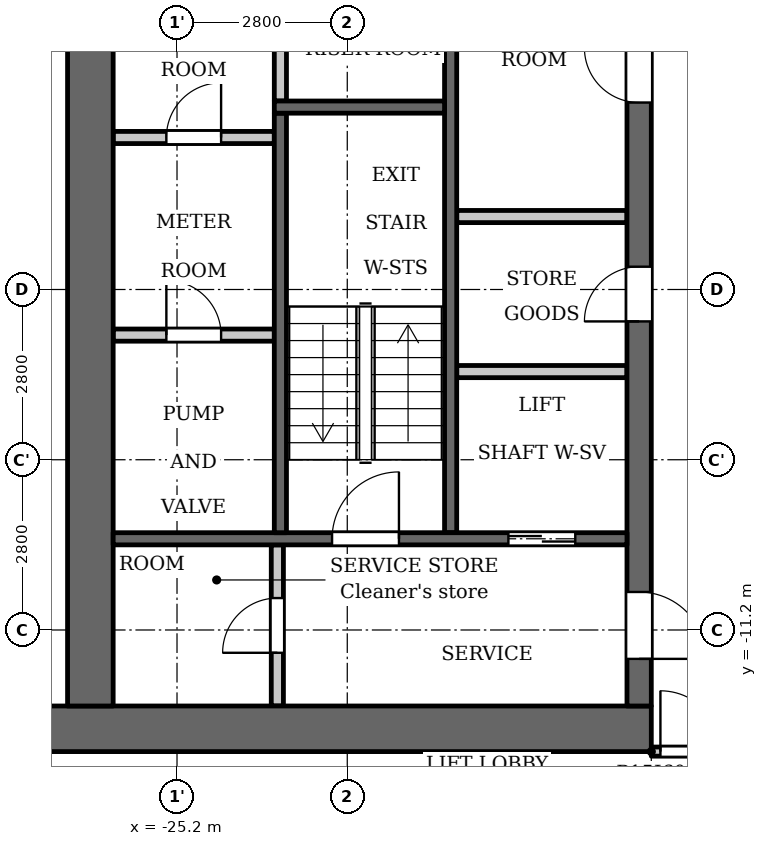
"""IFC4 building model, lengths in metres.
Left out: names, types, materials, properties, quantities, classifications, styles, units other than length and angle.
Written with IfcOpenShell. Run it as: python <this file> out.ifc"""

import sys

from ifc_helpers import new_model, si_unit, direction, frame, frame_2d, origin, place, context, subcontext, project, spatial, rectangle, extrude, element, fill, save


model = new_model("IFC4")
c1 = context("Model", 3, precision=1e-05, world=origin(), true_north=direction((0.0, 1.0)))
c2 = subcontext(c1, "Body", "Model", "MODEL_VIEW")
j1 = project(units=[si_unit("LENGTHUNIT", "METRE"), si_unit("PLANEANGLEUNIT", "RADIAN")], contexts=[c1])
p1 = place(None, origin())
s1 = spatial("IfcSite", under=j1, at=p1, CompositionType="ELEMENT")
p2 = place(p1, origin())
s2 = spatial("IfcBuilding", under=s1, at=p2, CompositionType="ELEMENT")
p3 = place(p2, frame((0.0, 0.0, 146.6)))
s3 = spatial("IfcBuildingStorey", under=s2, at=p3, CompositionType="ELEMENT", Elevation=146.6)
p4 = place(p3, frame((-23.5, -2.5, 0.0), z_axis=(0.0, 0.0, 1.0), x_axis=(0.0, 1.0, 0.0)))
e1 = element("IfcWall", 1, at=p4, inside=s3, PredefinedType="PARTITIONING", context=c2, shape_type="SweptSolid", body=[
    extrude(rectangle(XDim=2.65, YDim=0.2, at=frame_2d((1.325, 0.0))), origin(), (0.0, 0.0, 1.0), 3.2),
])
p5 = place(p3, frame((-20.7, -9.6, 0.0), z_axis=(0.0, 0.0, 1.0), x_axis=(0.0, 1.0, 0.0)))
e2 = element("IfcWall", 2, at=p5, inside=s3, PredefinedType="SHEAR", context=c2, shape_type="SweptSolid", body=[
    extrude(rectangle(XDim=9.75, YDim=0.2, at=frame_2d((4.875, 0.0))), origin(), (0.0, 0.0, 1.0), 3.2),
])
p6 = place(p3, frame((-17.4, -12.825, 0.0), z_axis=(0.0, 0.0, 1.0), x_axis=(-1.0, 0.0, 0.0)))
e3 = element("IfcWall", 3, at=p6, inside=s3, PredefinedType="SHEAR", context=c2, shape_type="SweptSolid", body=[
    extrude(rectangle(XDim=10.4, YDim=0.75, at=frame_2d((5.2, 0.0))), origin(), (0.0, 0.0, 1.0), 3.2),
])
p7 = place(p3, frame((-17.8, -4.4, 0.0), z_axis=(0.0, 0.0, 1.0), x_axis=(-1.0, 0.0, 0.0)))
e4 = element("IfcWall", 4, at=p7, inside=s3, PredefinedType="PARTITIONING", context=c2, shape_type="SweptSolid", body=[
    extrude(rectangle(XDim=2.8, YDim=0.2, at=frame_2d((1.4, 0.0))), origin(), (0.0, 0.0, 1.0), 3.2),
])
p8 = place(p3, frame((-17.6, -12.45, 0.0), z_axis=(0.0, 0.0, 1.0), x_axis=(0.0, 1.0, 0.0)))
e5 = element("IfcWall", 5, at=p8, inside=s3, PredefinedType="SHEAR", context=c2, shape_type="SweptSolid", body=[
    extrude(rectangle(XDim=24.9, YDim=0.4, at=frame_2d((12.45, 0.0))), origin(), (0.0, 0.0, 1.0), 3.2),
])
p9 = place(p8, frame((6.325, 0.0, 0.0)))
e6 = element("IfcOpeningElement", 6, at=p9, cuts=e5, PredefinedType="OPENING", context=c2, shape_type="SweptSolid", body=[
    extrude(rectangle(XDim=0.9, YDim=2.1, at=frame_2d((0.45, 1.05))), frame((0.0, 0.21, 0.0), z_axis=(0.0, -1.0, 0.0), x_axis=(1.0, 0.0, 0.0)), (0.0, 0.0, 1.0), 0.42),
])
p10 = place(p8, frame((9.925, 0.0, 0.0)))
e7 = element("IfcOpeningElement", 7, at=p10, cuts=e5, PredefinedType="OPENING", context=c2, shape_type="SweptSolid", body=[
    extrude(rectangle(XDim=0.9, YDim=2.1, at=frame_2d((0.45, 1.05))), frame((0.0, 0.21, 0.0), z_axis=(0.0, -1.0, 0.0), x_axis=(1.0, 0.0, 0.0)), (0.0, 0.0, 1.0), 0.42),
])
p11 = place(p8, frame((15.6, 0.0, 0.0)))
e8 = element("IfcOpeningElement", 8, at=p11, cuts=e5, PredefinedType="OPENING", context=c2, shape_type="SweptSolid", body=[
    extrude(rectangle(XDim=1.1, YDim=2.1, at=frame_2d((0.55, 1.05))), frame((0.0, 0.21, 0.0), z_axis=(0.0, -1.0, 0.0), x_axis=(1.0, 0.0, 0.0)), (0.0, 0.0, 1.0), 0.42),
])
p12 = place(p8, frame((18.0, 0.0, 0.0)))
e9 = element("IfcOpeningElement", 9, at=p12, cuts=e5, PredefinedType="OPENING", context=c2, shape_type="SweptSolid", body=[
    extrude(rectangle(XDim=1.1, YDim=2.1, at=frame_2d((0.55, 1.05))), frame((0.0, 0.21, 0.0), z_axis=(0.0, -1.0, 0.0), x_axis=(1.0, 0.0, 0.0)), (0.0, 0.0, 1.0), 0.42),
])
p13 = place(p8, frame((23.025, 0.0, 0.0)))
e10 = element("IfcOpeningElement", 10, at=p13, cuts=e5, PredefinedType="OPENING", context=c2, shape_type="SweptSolid", body=[
    extrude(rectangle(XDim=1.1, YDim=2.1, at=frame_2d((0.55, 1.05))), frame((0.0, 0.21, 0.0), z_axis=(0.0, -1.0, 0.0), x_axis=(1.0, 0.0, 0.0)), (0.0, 0.0, 1.0), 0.42),
])
p14 = place(p8, frame((0.775, 0.0, 0.0)))
e11 = element("IfcOpeningElement", 11, at=p14, cuts=e5, PredefinedType="OPENING", context=c2, shape_type="SweptSolid", body=[
    extrude(rectangle(XDim=1.1, YDim=2.1, at=frame_2d((0.55, 1.05))), frame((0.0, 0.21, 0.0), z_axis=(0.0, -1.0, 0.0), x_axis=(1.0, 0.0, 0.0)), (0.0, 0.0, 1.0), 0.42),
])
p15 = place(p8, frame((12.925, 0.0, 0.0)))
e12 = element("IfcOpeningElement", 12, at=p15, cuts=e5, PredefinedType="OPENING", context=c2, shape_type="SweptSolid", body=[
    extrude(rectangle(XDim=1.8, YDim=2.1, at=frame_2d((0.9, 1.05))), frame((0.0, 0.21, 0.0), z_axis=(0.0, -1.0, 0.0), x_axis=(1.0, 0.0, 0.0)), (0.0, 0.0, 1.0), 0.42),
])
p16 = place(p3, frame((-26.625, -12.45, 0.0), z_axis=(0.0, 0.0, 1.0), x_axis=(0.0, 1.0, 0.0)))
e13 = element("IfcWall", 13, at=p16, inside=s3, PredefinedType="SHEAR", context=c2, shape_type="SweptSolid", body=[
    extrude(rectangle(XDim=24.9, YDim=0.75, at=frame_2d((12.45, 0.0))), origin(), (0.0, 0.0, 1.0), 3.2),
])
p17 = place(p3, frame((-23.55, -12.45, 0.0), z_axis=(0.0, 0.0, 1.0), x_axis=(0.0, 1.0, 0.0)))
e14 = element("IfcWall", 14, at=p17, inside=s3, PredefinedType="PARTITIONING", context=c2, shape_type="SweptSolid", body=[
    extrude(rectangle(XDim=2.65, YDim=0.2, at=frame_2d((1.325, 0.0))), origin(), (0.0, 0.0, 1.0), 3.2),
])
p18 = place(p17, frame((0.875, 0.0, 0.0)))
e15 = element("IfcOpeningElement", 15, at=p18, cuts=e14, PredefinedType="OPENING", context=c2, shape_type="SweptSolid", body=[
    extrude(rectangle(XDim=0.9, YDim=2.1, at=frame_2d((0.45, 1.05))), frame((0.0, 0.11, 0.0), z_axis=(0.0, -1.0, 0.0), x_axis=(1.0, 0.0, 0.0)), (0.0, 0.0, 1.0), 0.22),
])
p19 = place(p3, frame((-23.6, -6.35, 0.0), z_axis=(0.0, 0.0, 1.0), x_axis=(-1.0, 0.0, 0.0)))
e16 = element("IfcWall", 16, at=p19, inside=s3, PredefinedType="PARTITIONING", context=c2, shape_type="SweptSolid", body=[
    extrude(rectangle(XDim=2.65, YDim=0.2, at=frame_2d((1.325, 0.0))), origin(), (0.0, 0.0, 1.0), 3.2),
])
p20 = place(p19, frame((0.875, 0.0, 0.0)))
e17 = element("IfcOpeningElement", 17, at=p20, cuts=e16, PredefinedType="OPENING", context=c2, shape_type="SweptSolid", body=[
    extrude(rectangle(XDim=0.9, YDim=2.1, at=frame_2d((0.45, 1.05))), frame((0.0, 0.11, 0.0), z_axis=(0.0, -1.0, 0.0), x_axis=(1.0, 0.0, 0.0)), (0.0, 0.0, 1.0), 0.22),
])
p21 = place(p3, frame((-23.6, -3.1, 0.0), z_axis=(0.0, 0.0, 1.0), x_axis=(-1.0, 0.0, 0.0)))
e18 = element("IfcWall", 18, at=p21, inside=s3, PredefinedType="PARTITIONING", context=c2, shape_type="SweptSolid", body=[
    extrude(rectangle(XDim=2.65, YDim=0.2, at=frame_2d((1.325, 0.0))), origin(), (0.0, 0.0, 1.0), 3.2),
])
p22 = place(p21, frame((0.875, 0.0, 0.0)))
e19 = element("IfcOpeningElement", 19, at=p22, cuts=e18, PredefinedType="OPENING", context=c2, shape_type="SweptSolid", body=[
    extrude(rectangle(XDim=0.9, YDim=2.1, at=frame_2d((0.45, 1.05))), frame((0.0, 0.11, 0.0), z_axis=(0.0, -1.0, 0.0), x_axis=(1.0, 0.0, 0.0)), (0.0, 0.0, 1.0), 0.22),
])
p23 = place(p3, frame((-17.8, -9.7, 0.0), z_axis=(0.0, 0.0, 1.0), x_axis=(-1.0, 0.0, 0.0)))
e20 = element("IfcWall", 20, at=p23, inside=s3, PredefinedType="SHEAR", context=c2, shape_type="SweptSolid", body=[
    extrude(rectangle(XDim=8.45, YDim=0.2, at=frame_2d((4.225, 0.0))), origin(), (0.0, 0.0, 1.0), 3.2),
])
p24 = place(p23, frame((0.85, 0.0, 0.0)))
e21 = element("IfcOpeningElement", 21, at=p24, cuts=e20, PredefinedType="OPENING", context=c2, shape_type="SweptSolid", body=[
    extrude(rectangle(XDim=1.1, YDim=2.1, at=frame_2d((0.55, 1.05))), frame((0.0, 0.11, 0.0), z_axis=(0.0, -1.0, 0.0), x_axis=(1.0, 0.0, 0.0)), (0.0, 0.0, 1.0), 0.22),
])
p25 = place(p23, frame((3.75, 0.0, 0.0)))
e22 = element("IfcOpeningElement", 22, at=p25, cuts=e20, PredefinedType="OPENING", context=c2, shape_type="SweptSolid", body=[
    extrude(rectangle(XDim=1.1, YDim=2.1, at=frame_2d((0.55, 1.05))), frame((0.0, 0.11, 0.0), z_axis=(0.0, -1.0, 0.0), x_axis=(1.0, 0.0, 0.0)), (0.0, 0.0, 1.0), 0.22),
])
p26 = place(p3, frame((-17.8, -6.95, 0.0), z_axis=(0.0, 0.0, 1.0), x_axis=(-1.0, 0.0, 0.0)))
e23 = element("IfcWall", 23, at=p26, inside=s3, PredefinedType="PARTITIONING", context=c2, shape_type="SweptSolid", body=[
    extrude(rectangle(XDim=2.8, YDim=0.2, at=frame_2d((1.4, 0.0))), origin(), (0.0, 0.0, 1.0), 3.2),
])
p27 = place(p3, frame((-23.5, -9.6, 0.0), z_axis=(0.0, 0.0, 1.0), x_axis=(0.0, 1.0, 0.0)))
e24 = element("IfcWall", 24, at=p27, inside=s3, PredefinedType="SHEAR", context=c2, shape_type="SweptSolid", body=[
    extrude(rectangle(XDim=6.9, YDim=0.2, at=frame_2d((3.45, 0.0))), origin(), (0.0, 0.0, 1.0), 3.2),
])
p28 = place(p3, frame((-20.8, -2.6, 0.0), z_axis=(0.0, 0.0, 1.0), x_axis=(-1.0, 0.0, 0.0)))
e25 = element("IfcWall", 25, at=p28, inside=s3, PredefinedType="SHEAR", context=c2, shape_type="SweptSolid", body=[
    extrude(rectangle(XDim=2.8, YDim=0.2, at=frame_2d((1.4, 0.0))), origin(), (0.0, 0.0, 1.0), 3.2),
])
p29 = place(p3, frame((-17.4, -13.2, 0.0), z_axis=(0.0, 0.0, 1.0), x_axis=(1.0, 0.0, 0.0)))
e26 = element("IfcWall", 26, at=p29, inside=s3, PredefinedType="PARTITIONING", context=c2, shape_type="SweptSolid", body=[
    extrude(rectangle(XDim=34.8, YDim=0.15, at=frame_2d((17.4, 0.0))), origin(), (0.0, 0.0, 1.0), 3.2),
])
p30 = place(p29, frame((0.15, 0.0, 0.0)))
e27 = element("IfcOpeningElement", 27, at=p30, cuts=e26, PredefinedType="OPENING", context=c2, shape_type="SweptSolid", body=[
    extrude(rectangle(XDim=1.0, YDim=2.1, at=frame_2d((0.5, 1.05))), frame((0.0, 0.085, 0.0), z_axis=(0.0, -1.0, 0.0), x_axis=(1.0, 0.0, 0.0)), (0.0, 0.0, 1.0), 0.17),
])
p31 = place(p29, frame((33.55, 0.0, 0.0)))
e28 = element("IfcOpeningElement", 28, at=p31, cuts=e26, PredefinedType="OPENING", context=c2, shape_type="SweptSolid", body=[
    extrude(rectangle(XDim=1.0, YDim=2.1, at=frame_2d((0.5, 1.05))), frame((0.0, 0.085, 0.0), z_axis=(0.0, -1.0, 0.0), x_axis=(1.0, 0.0, 0.0)), (0.0, 0.0, 1.0), 0.17),
])
p32 = place(p29, frame((15.7, 0.0, 0.0)))
e29 = element("IfcOpeningElement", 29, at=p32, cuts=e26, PredefinedType="OPENING", context=c2, shape_type="SweptSolid", body=[
    extrude(rectangle(XDim=1.0, YDim=2.1, at=frame_2d((0.5, 1.05))), frame((0.0, 0.085, 0.0), z_axis=(0.0, -1.0, 0.0), x_axis=(1.0, 0.0, 0.0)), (0.0, 0.0, 1.0), 0.17),
])
p33 = place(p24, origin())
e30 = element("IfcDoor", 30, at=p33, inside=s3, OperationType="DOUBLE_DOOR_SLIDING", PredefinedType="DOOR", context=c2, shape_type="SweptSolid", body=[
    extrude(rectangle(XDim=1.1, YDim=2.1, at=frame_2d((0.55, 1.05))), frame((0.0, 0.025, 0.0), z_axis=(0.0, -1.0, 0.0), x_axis=(1.0, 0.0, 0.0)), (0.0, 0.0, 1.0), 0.05),
])
fill(e21, e30)
p34 = place(p9, origin())
e31 = element("IfcDoor", 31, at=p34, inside=s3, OperationType="SINGLE_SWING_RIGHT", PredefinedType="DOOR", context=c2, shape_type="SweptSolid", body=[
    extrude(rectangle(XDim=0.9, YDim=2.1, at=frame_2d((0.45, 1.05))), frame((0.0, 0.025, 0.0), z_axis=(0.0, -1.0, 0.0), x_axis=(1.0, 0.0, 0.0)), (0.0, 0.0, 1.0), 0.05),
])
fill(e6, e31)
p35 = place(p10, origin())
e32 = element("IfcDoor", 32, at=p35, inside=s3, OperationType="SINGLE_SWING_LEFT", PredefinedType="DOOR", context=c2, shape_type="SweptSolid", body=[
    extrude(rectangle(XDim=0.9, YDim=2.1, at=frame_2d((0.45, 1.05))), frame((0.0, 0.025, 0.0), z_axis=(0.0, -1.0, 0.0), x_axis=(1.0, 0.0, 0.0)), (0.0, 0.0, 1.0), 0.05),
])
fill(e7, e32)
p36 = place(p14, origin())
e33 = element("IfcDoor", 33, at=p36, inside=s3, OperationType="SINGLE_SWING_LEFT", PredefinedType="DOOR", context=c2, shape_type="SweptSolid", body=[
    extrude(rectangle(XDim=1.1, YDim=2.1, at=frame_2d((0.55, 1.05))), frame((0.0, 0.025, 0.0), z_axis=(0.0, -1.0, 0.0), x_axis=(1.0, 0.0, 0.0)), (0.0, 0.0, 1.0), 0.05),
])
fill(e11, e33)
p37 = place(p18, origin())
e34 = element("IfcDoor", 34, at=p37, inside=s3, OperationType="SINGLE_SWING_RIGHT", PredefinedType="DOOR", context=c2, shape_type="SweptSolid", body=[
    extrude(rectangle(XDim=0.9, YDim=2.1, at=frame_2d((0.45, 1.05))), frame((0.0, 0.025, 0.0), z_axis=(0.0, -1.0, 0.0), x_axis=(1.0, 0.0, 0.0)), (0.0, 0.0, 1.0), 0.05),
])
fill(e15, e34)
p38 = place(p25, origin())
e35 = element("IfcDoor", 35, at=p38, inside=s3, OperationType="SINGLE_SWING_LEFT", PredefinedType="DOOR", context=c2, shape_type="SweptSolid", body=[
    extrude(rectangle(XDim=1.1, YDim=2.1, at=frame_2d((0.55, 1.05))), frame((0.0, 0.025, 0.0), z_axis=(0.0, -1.0, 0.0), x_axis=(1.0, 0.0, 0.0)), (0.0, 0.0, 1.0), 0.05),
])
fill(e22, e35)
p39 = place(p20, origin())
e36 = element("IfcDoor", 36, at=p39, inside=s3, OperationType="SINGLE_SWING_RIGHT", PredefinedType="DOOR", context=c2, shape_type="SweptSolid", body=[
    extrude(rectangle(XDim=0.9, YDim=2.1, at=frame_2d((0.45, 1.05))), frame((0.0, 0.025, 0.0), z_axis=(0.0, -1.0, 0.0), x_axis=(1.0, 0.0, 0.0)), (0.0, 0.0, 1.0), 0.05),
])
fill(e17, e36)
p40 = place(p22, origin())
e37 = element("IfcDoor", 37, at=p40, inside=s3, OperationType="SINGLE_SWING_LEFT", PredefinedType="DOOR", context=c2, shape_type="SweptSolid", body=[
    extrude(rectangle(XDim=0.9, YDim=2.1, at=frame_2d((0.45, 1.05))), frame((0.0, 0.025, 0.0), z_axis=(0.0, -1.0, 0.0), x_axis=(1.0, 0.0, 0.0)), (0.0, 0.0, 1.0), 0.05),
])
fill(e19, e37)
p41 = place(p30, origin())
e38 = element("IfcDoor", 38, at=p41, inside=s3, OperationType="SINGLE_SWING_RIGHT", PredefinedType="DOOR", context=c2, shape_type="SweptSolid", body=[
    extrude(rectangle(XDim=1.0, YDim=2.1, at=frame_2d((0.5, 1.05))), frame((0.0, 0.025, 0.0), z_axis=(0.0, -1.0, 0.0), x_axis=(1.0, 0.0, 0.0)), (0.0, 0.0, 1.0), 0.05),
])
fill(e27, e38)
save(model, sys.argv[1])
